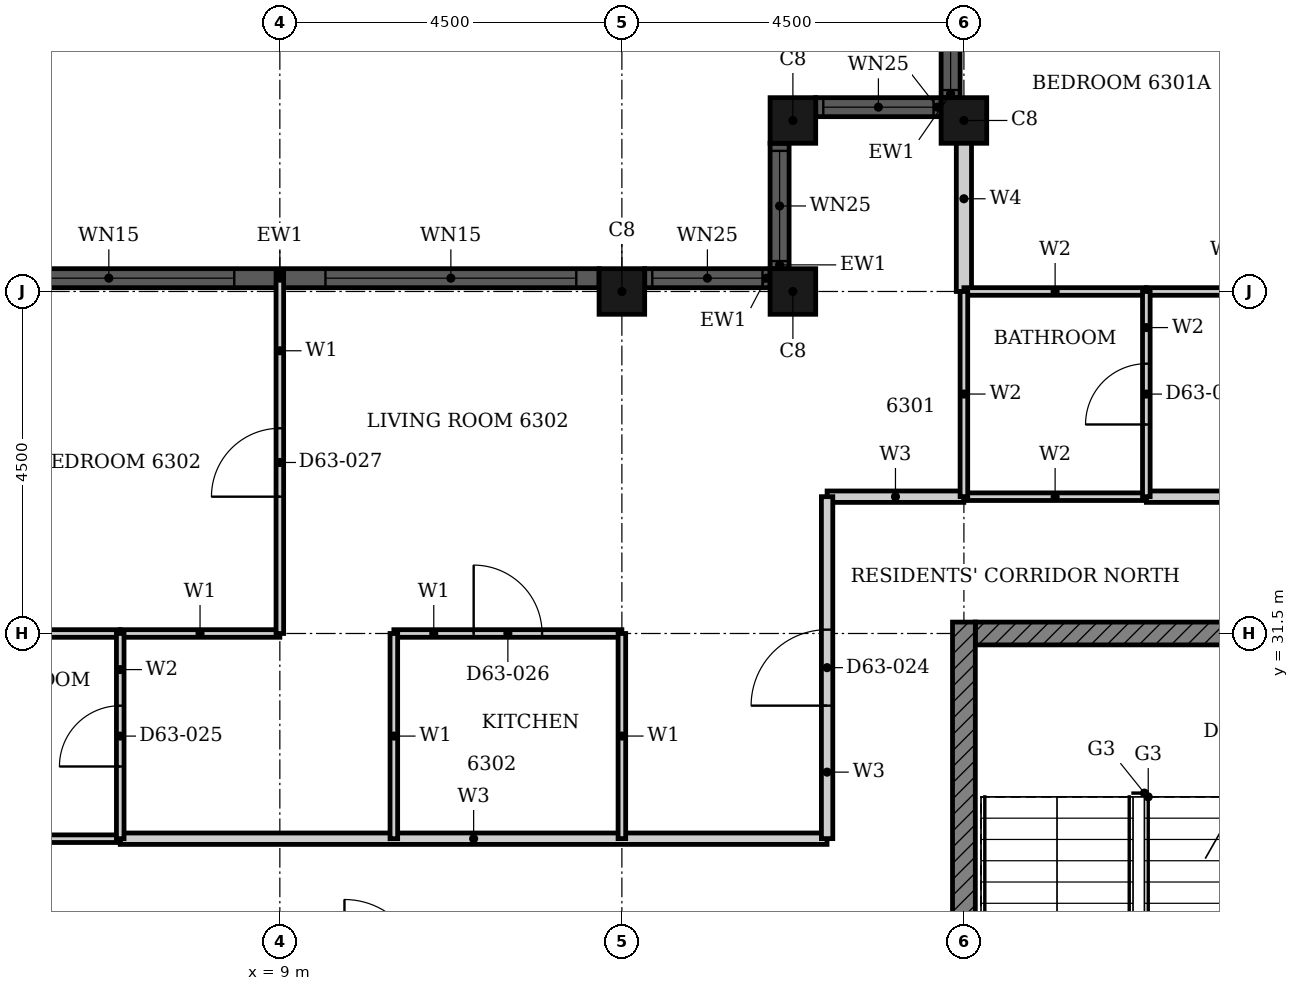
"""IFC4 building model, lengths in metres.
Left out: names, types, materials, properties, quantities, classifications, styles, units other than length and angle.
Written with IfcOpenShell. Run it as: python <this file> out.ifc"""

import sys

from ifc_helpers import new_model, si_unit, direction, frame, frame_2d, origin, origin_2d, place, context, subcontext, project, spatial, rectangle, hollow_rectangle, extrude, element, fill, save


model = new_model("IFC4")
c1 = context("Model", 3, precision=1e-05, world=origin(), true_north=direction((0.0, 1.0)))
c2 = subcontext(c1, "Body", "Model", "MODEL_VIEW")
j1 = project(units=[si_unit("LENGTHUNIT", "METRE"), si_unit("PLANEANGLEUNIT", "RADIAN")], contexts=[c1])
p1 = place(None, origin())
s1 = spatial("IfcSite", under=j1, at=p1, CompositionType="ELEMENT")
p2 = place(p1, origin())
s2 = spatial("IfcBuilding", under=s1, at=p2, CompositionType="ELEMENT")
p3 = place(p2, frame((0.0, 0.0, 249.0)))
s3 = spatial("IfcBuildingStorey", under=s2, at=p3, CompositionType="ELEMENT", Elevation=249.0)
for number, where, z_axis, x_axis in (
    (1, (18.0, 38.25, 0.0), (0.0, 0.0, 1.0), (1.0, 0.0, 0.0)),
    (2, (15.75, 38.25, 0.0), (0.0, 0.0, 1.0), (1.0, 0.0, 0.0)),
    (3, (15.75, 36.0, 0.0), (0.0, 0.0, 1.0), (1.0, 0.0, 0.0)),
    (4, (13.5, 36.0, 0.0), (0.0, 0.0, 1.0), (1.0, 0.0, 0.0)),
):
    element("IfcColumn", number, at=place(p3, frame(where, z_axis=z_axis, x_axis=x_axis)), inside=s3, PredefinedType="COLUMN", context=c2, shape_type="SweptSolid", body=[
        extrude(hollow_rectangle(XDim=0.6, YDim=0.6, WallThickness=0.02, at=origin_2d()), origin(), (0.0, 0.0, 1.0), 3.7),
    ])
p4 = place(p3, frame((17.825, 40.2, 0.0), z_axis=(0.0, 0.0, 1.0), x_axis=(0.0, -1.0, 0.0)))
e5 = element("IfcWall", 5, at=p4, inside=s3, PredefinedType="SOLIDWALL", context=c2, shape_type="SweptSolid", body=[
    extrude(rectangle(XDim=1.65, YDim=0.25, at=frame_2d((0.825, 0.0))), origin(), (0.0, 0.0, 1.0), 3.7),
])
p5 = place(p4, frame((0.1, 0.0, 0.9)))
e6 = element("IfcOpeningElement", 6, at=p5, cuts=e5, PredefinedType="OPENING", context=c2, shape_type="SweptSolid", body=[
    extrude(rectangle(XDim=1.45, YDim=1.85, at=frame_2d((0.725, 0.925))), frame((0.0, 0.135, 0.0), z_axis=(0.0, -1.0, 0.0), x_axis=(1.0, 0.0, 0.0)), (0.0, 0.0, 1.0), 0.27),
])
p6 = place(p3, frame((17.7, 38.425, 0.0), z_axis=(0.0, 0.0, 1.0), x_axis=(-1.0, 0.0, 0.0)))
e7 = element("IfcWall", 7, at=p6, inside=s3, PredefinedType="SOLIDWALL", context=c2, shape_type="SweptSolid", body=[
    extrude(rectangle(XDim=1.65, YDim=0.25, at=frame_2d((0.825, 0.0))), origin(), (0.0, 0.0, 1.0), 3.7),
])
p7 = place(p6, frame((0.1, 0.0, 0.9)))
e8 = element("IfcOpeningElement", 8, at=p7, cuts=e7, PredefinedType="OPENING", context=c2, shape_type="SweptSolid", body=[
    extrude(rectangle(XDim=1.45, YDim=1.85, at=frame_2d((0.725, 0.925))), frame((0.0, 0.135, 0.0), z_axis=(0.0, -1.0, 0.0), x_axis=(1.0, 0.0, 0.0)), (0.0, 0.0, 1.0), 0.27),
])
p8 = place(p3, frame((15.575, 37.95, 0.0), z_axis=(0.0, 0.0, 1.0), x_axis=(0.0, -1.0, 0.0)))
e9 = element("IfcWall", 9, at=p8, inside=s3, PredefinedType="SOLIDWALL", context=c2, shape_type="SweptSolid", body=[
    extrude(rectangle(XDim=1.65, YDim=0.25, at=frame_2d((0.825, 0.0))), origin(), (0.0, 0.0, 1.0), 3.7),
])
p9 = place(p8, frame((0.1, 0.0, 0.9)))
e10 = element("IfcOpeningElement", 10, at=p9, cuts=e9, PredefinedType="OPENING", context=c2, shape_type="SweptSolid", body=[
    extrude(rectangle(XDim=1.45, YDim=1.85, at=frame_2d((0.725, 0.925))), frame((0.0, 0.135, 0.0), z_axis=(0.0, -1.0, 0.0), x_axis=(1.0, 0.0, 0.0)), (0.0, 0.0, 1.0), 0.27),
])
p10 = place(p3, frame((15.45, 36.175, 0.0), z_axis=(0.0, 0.0, 1.0), x_axis=(-1.0, 0.0, 0.0)))
e11 = element("IfcWall", 11, at=p10, inside=s3, PredefinedType="SOLIDWALL", context=c2, shape_type="SweptSolid", body=[
    extrude(rectangle(XDim=1.65, YDim=0.25, at=frame_2d((0.825, 0.0))), origin(), (0.0, 0.0, 1.0), 3.7),
])
p11 = place(p10, frame((0.1, 0.0, 0.9)))
e12 = element("IfcOpeningElement", 12, at=p11, cuts=e11, PredefinedType="OPENING", context=c2, shape_type="SweptSolid", body=[
    extrude(rectangle(XDim=1.45, YDim=1.85, at=frame_2d((0.725, 0.925))), frame((0.0, 0.135, 0.0), z_axis=(0.0, -1.0, 0.0), x_axis=(1.0, 0.0, 0.0)), (0.0, 0.0, 1.0), 0.27),
])
p12 = place(p3, frame((13.2, 36.175, 0.0), z_axis=(0.0, 0.0, 1.0), x_axis=(-1.0, 0.0, 0.0)))
e13 = element("IfcWall", 13, at=p12, inside=s3, PredefinedType="SOLIDWALL", context=c2, shape_type="SweptSolid", body=[
    extrude(rectangle(XDim=8.4, YDim=0.25, at=frame_2d((4.2, 0.0))), origin(), (0.0, 0.0, 1.0), 3.7),
])
p13 = place(p12, frame((0.3, 0.0, 0.45)))
e14 = element("IfcOpeningElement", 14, at=p13, cuts=e13, PredefinedType="OPENING", context=c2, shape_type="SweptSolid", body=[
    extrude(rectangle(XDim=3.3, YDim=2.3, at=frame_2d((1.65, 1.15))), frame((0.0, 0.135, 0.0), z_axis=(0.0, -1.0, 0.0), x_axis=(1.0, 0.0, 0.0)), (0.0, 0.0, 1.0), 0.27),
])
p14 = place(p12, frame((4.8, 0.0, 0.45)))
e15 = element("IfcOpeningElement", 15, at=p14, cuts=e13, PredefinedType="OPENING", context=c2, shape_type="SweptSolid", body=[
    extrude(rectangle(XDim=3.3, YDim=2.3, at=frame_2d((1.65, 1.15))), frame((0.0, 0.135, 0.0), z_axis=(0.0, -1.0, 0.0), x_axis=(1.0, 0.0, 0.0)), (0.0, 0.0, 1.0), 0.27),
])
p15 = place(p3, frame((18.15, 31.5, 0.0), z_axis=(0.0, 0.0, 1.0), x_axis=(1.0, 0.0, 0.0)))
e16 = element("IfcWall", 16, at=p15, inside=s3, PredefinedType="SHEAR", context=c2, shape_type="SweptSolid", body=[
    extrude(rectangle(XDim=9.368, YDim=0.3, at=frame_2d((4.684, 0.0))), origin(), (0.0, 0.0, 1.0), 3.4),
])
p16 = place(p15, frame((4.736, 0.0, 0.0)))
e17 = element("IfcOpeningElement", 17, at=p16, cuts=e16, PredefinedType="OPENING", context=c2, shape_type="SweptSolid", body=[
    extrude(rectangle(XDim=1.8, YDim=2.1, at=frame_2d((0.9, 1.05))), frame((0.0, 0.16, 0.0), z_axis=(0.0, -1.0, 0.0), x_axis=(1.0, 0.0, 0.0)), (0.0, 0.0, 1.0), 0.32),
])
p17 = place(p3, frame((18.0, 22.35, 0.0), z_axis=(0.0, 0.0, 1.0), x_axis=(0.0, 1.0, 0.0)))
e18 = element("IfcWall", 18, at=p17, inside=s3, PredefinedType="SHEAR", context=c2, shape_type="SweptSolid", body=[
    extrude(rectangle(XDim=9.3, YDim=0.3, at=frame_2d((4.65, 0.0))), origin(), (0.0, 0.0, 1.0), 3.4),
])
p18 = place(p3, frame((6.9, 28.8, 0.0), z_axis=(0.0, 0.0, 1.0), x_axis=(1.0, 0.0, 0.0)))
e19 = element("IfcWall", 19, at=p18, inside=s3, PredefinedType="PARTITIONING", context=c2, shape_type="SweptSolid", body=[
    extrude(rectangle(XDim=9.299, YDim=0.15, at=frame_2d((4.649, 0.0))), origin(), (0.0, 0.0, 1.0), 3.4),
])
p19 = place(p3, frame((20.4, 33.3, 0.0), z_axis=(0.0, 0.0, 1.0), x_axis=(1.0, 0.0, 0.0)))
e20 = element("IfcWall", 20, at=p19, inside=s3, PredefinedType="PARTITIONING", context=c2, shape_type="SweptSolid", body=[
    extrude(rectangle(XDim=24.6, YDim=0.15, at=frame_2d((12.3, 0.0))), origin(), (0.0, 0.0, 1.0), 3.4),
])
p20 = place(p19, frame((1.6, 0.0, 0.0)))
e21 = element("IfcOpeningElement", 21, at=p20, cuts=e20, PredefinedType="OPENING", context=c2, shape_type="SweptSolid", body=[
    extrude(rectangle(XDim=1.0, YDim=2.2, at=frame_2d((0.5, 1.1))), frame((0.0, 0.085, 0.0), z_axis=(0.0, -1.0, 0.0), x_axis=(1.0, 0.0, 0.0)), (0.0, 0.0, 1.0), 0.17),
])
p21 = place(p19, frame((17.35, 0.0, 0.0)))
e22 = element("IfcOpeningElement", 22, at=p21, cuts=e20, PredefinedType="OPENING", context=c2, shape_type="SweptSolid", body=[
    extrude(rectangle(XDim=1.0, YDim=2.1, at=frame_2d((0.5, 1.05))), frame((0.0, 0.085, 0.0), z_axis=(0.0, -1.0, 0.0), x_axis=(1.0, 0.0, 0.0)), (0.0, 0.0, 1.0), 0.17),
])
p22 = place(p3, frame((16.2, 33.3, 0.0), z_axis=(0.0, 0.0, 1.0), x_axis=(1.0, 0.0, 0.0)))
e23 = element("IfcWall", 23, at=p22, inside=s3, PredefinedType="PARTITIONING", context=c2, shape_type="SweptSolid", body=[
    extrude(rectangle(XDim=1.799, YDim=0.15, at=frame_2d((0.899, 0.0))), origin(), (0.0, 0.0, 1.0), 3.4),
])
p23 = place(p3, frame((16.2, 28.801, 0.0), z_axis=(0.0, 0.0, 1.0), x_axis=(0.0, 1.0, 0.0)))
e24 = element("IfcWall", 24, at=p23, inside=s3, PredefinedType="PARTITIONING", context=c2, shape_type="SweptSolid", body=[
    extrude(rectangle(XDim=4.499, YDim=0.15, at=frame_2d((2.25, 0.0))), origin(), (0.0, 0.0, 1.0), 3.4),
])
p24 = place(p23, frame((1.75, 0.0, 0.0)))
e25 = element("IfcOpeningElement", 25, at=p24, cuts=e24, PredefinedType="OPENING", context=c2, shape_type="SweptSolid", body=[
    extrude(rectangle(XDim=1.0, YDim=2.2, at=frame_2d((0.5, 1.1))), frame((0.0, 0.085, 0.0), z_axis=(0.0, -1.0, 0.0), x_axis=(1.0, 0.0, 0.0)), (0.0, 0.0, 1.0), 0.17),
])
p25 = place(p3, frame((6.9, 31.5, 0.0), z_axis=(0.0, 0.0, 1.0), x_axis=(1.0, 0.0, 0.0)))
e26 = element("IfcWall", 26, at=p25, inside=s3, PredefinedType="PARTITIONING", context=c2, shape_type="SweptSolid", body=[
    extrude(rectangle(XDim=2.1, YDim=0.1, at=frame_2d((1.05, 0.0))), origin(), (0.0, 0.0, 1.0), 2.68),
])
p26 = place(p3, frame((10.5, 31.5, 0.0), z_axis=(0.0, 0.0, 1.0), x_axis=(1.0, 0.0, 0.0)))
e27 = element("IfcWall", 27, at=p26, inside=s3, PredefinedType="PARTITIONING", context=c2, shape_type="SweptSolid", body=[
    extrude(rectangle(XDim=3.0, YDim=0.1, at=frame_2d((1.5, 0.0))), origin(), (0.0, 0.0, 1.0), 2.68),
])
p27 = place(p26, frame((1.05, 0.0, 0.0)))
e28 = element("IfcOpeningElement", 28, at=p27, cuts=e27, PredefinedType="OPENING", context=c2, shape_type="SweptSolid", body=[
    extrude(rectangle(XDim=0.9, YDim=2.1, at=frame_2d((0.45, 1.05))), frame((0.0, 0.06, 0.0), z_axis=(0.0, -1.0, 0.0), x_axis=(1.0, 0.0, 0.0)), (0.0, 0.0, 1.0), 0.12),
])
p28 = place(p3, frame((20.4, 36.0, 0.0), z_axis=(0.0, 0.0, 1.0), x_axis=(1.0, 0.0, 0.0)))
e29 = element("IfcWall", 29, at=p28, inside=s3, PredefinedType="PARTITIONING", context=c2, shape_type="SweptSolid", body=[
    extrude(rectangle(XDim=2.1, YDim=0.1, at=frame_2d((1.05, 0.0))), origin(), (0.0, 0.0, 1.0), 3.4),
])
p29 = place(p3, frame((10.5, 28.8, 0.0), z_axis=(0.0, 0.0, 1.0), x_axis=(0.0, 1.0, 0.0)))
e30 = element("IfcWall", 30, at=p29, inside=s3, PredefinedType="PARTITIONING", context=c2, shape_type="SweptSolid", body=[
    extrude(rectangle(XDim=2.7, YDim=0.1, at=frame_2d((1.35, 0.0))), origin(), (0.0, 0.0, 1.0), 3.4),
])
p30 = place(p3, frame((13.5, 28.801, 0.0), z_axis=(0.0, 0.0, 1.0), x_axis=(0.0, 1.0, 0.0)))
e31 = element("IfcWall", 31, at=p30, inside=s3, PredefinedType="PARTITIONING", context=c2, shape_type="SweptSolid", body=[
    extrude(rectangle(XDim=2.699, YDim=0.1, at=frame_2d((1.35, 0.0))), origin(), (0.0, 0.0, 1.0), 2.48),
])
p31 = place(p3, frame((9.0, 31.5, 0.0), z_axis=(0.0, 0.0, 1.0), x_axis=(0.0, 1.0, 0.0)))
e32 = element("IfcWall", 32, at=p31, inside=s3, PredefinedType="PARTITIONING", context=c2, shape_type="SweptSolid", body=[
    extrude(rectangle(XDim=4.74, YDim=0.1, at=frame_2d((2.37, 0.0))), origin(), (0.0, 0.0, 1.0), 3.4),
])
p32 = place(p31, frame((1.8, 0.0, 0.0)))
e33 = element("IfcOpeningElement", 33, at=p32, cuts=e32, PredefinedType="OPENING", context=c2, shape_type="SweptSolid", body=[
    extrude(rectangle(XDim=0.9, YDim=2.1, at=frame_2d((0.45, 1.05))), frame((0.0, 0.06, 0.0), z_axis=(0.0, -1.0, 0.0), x_axis=(1.0, 0.0, 0.0)), (0.0, 0.0, 1.0), 0.12),
])
p33 = place(p3, frame((18.0, 36.0, 0.0), z_axis=(0.0, 0.0, 1.0), x_axis=(0.0, 1.0, 0.0)))
e34 = element("IfcWall", 34, at=p33, inside=s3, PredefinedType="PARTITIONING", context=c2, shape_type="SweptSolid", body=[
    extrude(rectangle(XDim=2.44, YDim=0.2, at=frame_2d((1.22, 0.0))), origin(), (0.0, 0.0, 1.0), 3.4),
])
p34 = place(p3, frame((4.5, 28.8, 0.0), z_axis=(0.0, 0.0, 1.0), x_axis=(1.0, 0.0, 0.0)))
e35 = element("IfcWall", 35, at=p34, inside=s3, PredefinedType="PARTITIONING", context=c2, shape_type="SweptSolid", body=[
    extrude(rectangle(XDim=2.4, YDim=0.1, at=frame_2d((1.2, 0.0))), origin(), (0.0, 0.0, 1.0), 3.4),
])
p35 = place(p3, frame((4.5, 31.5, 0.0), z_axis=(0.0, 0.0, 1.0), x_axis=(1.0, 0.0, 0.0)))
e36 = element("IfcWall", 36, at=p35, inside=s3, PredefinedType="PARTITIONING", context=c2, shape_type="SweptSolid", body=[
    extrude(rectangle(XDim=2.4, YDim=0.1, at=frame_2d((1.2, 0.0))), origin(), (0.0, 0.0, 1.0), 2.68),
])
for number, where, z_axis, x_axis in (
    (37, (18.0, 33.3, 0.0), (0.0, 0.0, 1.0), (1.0, 0.0, 0.0)),
    (38, (18.0, 36.0, 0.0), (0.0, 0.0, 1.0), (1.0, 0.0, 0.0)),
):
    element("IfcWall", number, at=place(p3, frame(where, z_axis=z_axis, x_axis=x_axis)), inside=s3, PredefinedType="PARTITIONING", context=c2, shape_type="SweptSolid", body=[
        extrude(rectangle(XDim=2.4, YDim=0.1, at=frame_2d((1.2, 0.0))), origin(), (0.0, 0.0, 1.0), 3.4),
    ])
p36 = place(p3, frame((18.0, 33.301, 0.0), z_axis=(0.0, 0.0, 1.0), x_axis=(0.0, 1.0, 0.0)))
e39 = element("IfcWall", 39, at=p36, inside=s3, PredefinedType="PARTITIONING", context=c2, shape_type="SweptSolid", body=[
    extrude(rectangle(XDim=2.699, YDim=0.1, at=frame_2d((1.35, 0.0))), origin(), (0.0, 0.0, 1.0), 3.4),
])
p37 = place(p3, frame((20.4, 33.3, 0.0), z_axis=(0.0, 0.0, 1.0), x_axis=(0.0, 1.0, 0.0)))
e40 = element("IfcWall", 40, at=p37, inside=s3, PredefinedType="PARTITIONING", context=c2, shape_type="SweptSolid", body=[
    extrude(rectangle(XDim=2.7, YDim=0.1, at=frame_2d((1.35, 0.0))), origin(), (0.0, 0.0, 1.0), 3.4),
])
p38 = place(p37, frame((0.95, 0.0, 0.0)))
e41 = element("IfcOpeningElement", 41, at=p38, cuts=e40, PredefinedType="OPENING", context=c2, shape_type="SweptSolid", body=[
    extrude(rectangle(XDim=0.8, YDim=2.1, at=frame_2d((0.4, 1.05))), frame((0.0, 0.06, 0.0), z_axis=(0.0, -1.0, 0.0), x_axis=(1.0, 0.0, 0.0)), (0.0, 0.0, 1.0), 0.12),
])
p39 = place(p3, frame((6.9, 28.8, 0.0), z_axis=(0.0, 0.0, 1.0), x_axis=(0.0, 1.0, 0.0)))
e42 = element("IfcWall", 42, at=p39, inside=s3, PredefinedType="PARTITIONING", context=c2, shape_type="SweptSolid", body=[
    extrude(rectangle(XDim=2.7, YDim=0.1, at=frame_2d((1.35, 0.0))), origin(), (0.0, 0.0, 1.0), 3.4),
])
p40 = place(p39, frame((0.95, 0.0, 0.0)))
e43 = element("IfcOpeningElement", 43, at=p40, cuts=e42, PredefinedType="OPENING", context=c2, shape_type="SweptSolid", body=[
    extrude(rectangle(XDim=0.8, YDim=2.1, at=frame_2d((0.4, 1.05))), frame((0.0, 0.06, 0.0), z_axis=(0.0, -1.0, 0.0), x_axis=(1.0, 0.0, 0.0)), (0.0, 0.0, 1.0), 0.12),
])
p41 = place(p5, origin())
e44 = element("IfcWindow", 44, at=p41, inside=s3, PartitioningType="SINGLE_PANEL", PredefinedType="WINDOW", context=c2, shape_type="SweptSolid", body=[
    extrude(rectangle(XDim=1.45, YDim=1.85, at=frame_2d((0.725, 0.925))), frame((0.0, 0.03, 0.0), z_axis=(0.0, -1.0, 0.0), x_axis=(1.0, 0.0, 0.0)), (0.0, 0.0, 1.0), 0.06),
])
fill(e6, e44)
p42 = place(p7, origin())
e45 = element("IfcWindow", 45, at=p42, inside=s3, PartitioningType="SINGLE_PANEL", PredefinedType="WINDOW", context=c2, shape_type="SweptSolid", body=[
    extrude(rectangle(XDim=1.45, YDim=1.85, at=frame_2d((0.725, 0.925))), frame((0.0, 0.03, 0.0), z_axis=(0.0, -1.0, 0.0), x_axis=(1.0, 0.0, 0.0)), (0.0, 0.0, 1.0), 0.06),
])
fill(e8, e45)
p43 = place(p9, origin())
e46 = element("IfcWindow", 46, at=p43, inside=s3, PartitioningType="SINGLE_PANEL", PredefinedType="WINDOW", context=c2, shape_type="SweptSolid", body=[
    extrude(rectangle(XDim=1.45, YDim=1.85, at=frame_2d((0.725, 0.925))), frame((0.0, 0.03, 0.0), z_axis=(0.0, -1.0, 0.0), x_axis=(1.0, 0.0, 0.0)), (0.0, 0.0, 1.0), 0.06),
])
fill(e10, e46)
p44 = place(p11, origin())
e47 = element("IfcWindow", 47, at=p44, inside=s3, PartitioningType="SINGLE_PANEL", PredefinedType="WINDOW", context=c2, shape_type="SweptSolid", body=[
    extrude(rectangle(XDim=1.45, YDim=1.85, at=frame_2d((0.725, 0.925))), frame((0.0, 0.03, 0.0), z_axis=(0.0, -1.0, 0.0), x_axis=(1.0, 0.0, 0.0)), (0.0, 0.0, 1.0), 0.06),
])
fill(e12, e47)
p45 = place(p13, origin())
e48 = element("IfcWindow", 48, at=p45, inside=s3, PartitioningType="SINGLE_PANEL", PredefinedType="WINDOW", context=c2, shape_type="SweptSolid", body=[
    extrude(rectangle(XDim=3.3, YDim=2.3, at=frame_2d((1.65, 1.15))), frame((0.0, 0.03, 0.0), z_axis=(0.0, -1.0, 0.0), x_axis=(1.0, 0.0, 0.0)), (0.0, 0.0, 1.0), 0.06),
])
fill(e14, e48)
p46 = place(p14, origin())
e49 = element("IfcWindow", 49, at=p46, inside=s3, PartitioningType="SINGLE_PANEL", PredefinedType="WINDOW", context=c2, shape_type="SweptSolid", body=[
    extrude(rectangle(XDim=3.3, YDim=2.3, at=frame_2d((1.65, 1.15))), frame((0.0, 0.03, 0.0), z_axis=(0.0, -1.0, 0.0), x_axis=(1.0, 0.0, 0.0)), (0.0, 0.0, 1.0), 0.06),
])
fill(e15, e49)
p47 = place(p38, origin())
e50 = element("IfcDoor", 50, at=p47, inside=s3, OperationType="SINGLE_SWING_LEFT", PredefinedType="DOOR", context=c2, shape_type="SweptSolid", body=[
    extrude(rectangle(XDim=0.8, YDim=2.1, at=frame_2d((0.4, 1.05))), frame((0.0, 0.025, 0.0), z_axis=(0.0, -1.0, 0.0), x_axis=(1.0, 0.0, 0.0)), (0.0, 0.0, 1.0), 0.05),
])
fill(e41, e50)
p48 = place(p24, origin())
e51 = element("IfcDoor", 51, at=p48, inside=s3, OperationType="SINGLE_SWING_RIGHT", PredefinedType="DOOR", context=c2, shape_type="SweptSolid", body=[
    extrude(rectangle(XDim=1.0, YDim=2.2, at=frame_2d((0.5, 1.1))), frame((0.0, 0.025, 0.0), z_axis=(0.0, -1.0, 0.0), x_axis=(1.0, 0.0, 0.0)), (0.0, 0.0, 1.0), 0.05),
])
fill(e25, e51)
p49 = place(p40, origin())
e52 = element("IfcDoor", 52, at=p49, inside=s3, OperationType="SINGLE_SWING_LEFT", PredefinedType="DOOR", context=c2, shape_type="SweptSolid", body=[
    extrude(rectangle(XDim=0.8, YDim=2.1, at=frame_2d((0.4, 1.05))), frame((0.0, 0.025, 0.0), z_axis=(0.0, -1.0, 0.0), x_axis=(1.0, 0.0, 0.0)), (0.0, 0.0, 1.0), 0.05),
])
fill(e43, e52)
p50 = place(p27, origin())
e53 = element("IfcDoor", 53, at=p50, inside=s3, OperationType="SINGLE_SWING_LEFT", PredefinedType="DOOR", context=c2, shape_type="SweptSolid", body=[
    extrude(rectangle(XDim=0.9, YDim=2.1, at=frame_2d((0.45, 1.05))), frame((0.0, 0.025, 0.0), z_axis=(0.0, -1.0, 0.0), x_axis=(1.0, 0.0, 0.0)), (0.0, 0.0, 1.0), 0.05),
])
fill(e28, e53)
p51 = place(p32, origin())
e54 = element("IfcDoor", 54, at=p51, inside=s3, OperationType="SINGLE_SWING_LEFT", PredefinedType="DOOR", context=c2, shape_type="SweptSolid", body=[
    extrude(rectangle(XDim=0.9, YDim=2.1, at=frame_2d((0.45, 1.05))), frame((0.0, 0.025, 0.0), z_axis=(0.0, -1.0, 0.0), x_axis=(1.0, 0.0, 0.0)), (0.0, 0.0, 1.0), 0.05),
])
fill(e33, e54)
save(model, sys.argv[1])
